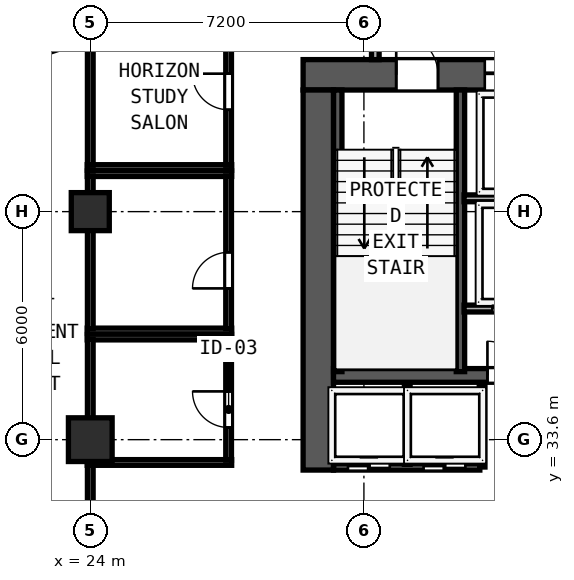
"""IFC4 building model, lengths in metres.
Left out: names, types, materials, properties, quantities, classifications, styles, units other than length and angle.
Written with IfcOpenShell. Run it as: python <this file> out.ifc"""

import sys

from ifc_helpers import new_model, si_unit, direction, frame, frame_2d, origin, origin_2d, place, context, subcontext, project, spatial, rectangle, hollow_rectangle, extrude, element, fill, save


model = new_model("IFC4")
c1 = context("Model", 3, precision=1e-05, world=origin(), true_north=direction((0.0, 1.0)))
c2 = subcontext(c1, "Body", "Model", "MODEL_VIEW")
j1 = project(units=[si_unit("LENGTHUNIT", "METRE"), si_unit("PLANEANGLEUNIT", "RADIAN")], contexts=[c1])
p1 = place(None, origin())
s1 = spatial("IfcSite", under=j1, at=p1, CompositionType="ELEMENT")
p2 = place(p1, origin())
s2 = spatial("IfcBuilding", under=s1, at=p2, CompositionType="ELEMENT")
p3 = place(p2, frame((0.0, 0.0, 70.4)))
s3 = spatial("IfcBuildingStorey", under=s2, at=p3, CompositionType="ELEMENT", Elevation=70.4)
p4 = place(p3, frame((29.6, 43.2, 0.0), z_axis=(0.0, 0.0, 1.0), x_axis=(1.0, 0.0, 0.0)))
e1 = element("IfcWall", 1, at=p4, inside=s3, PredefinedType="SHEAR", context=c2, shape_type="SweptSolid", body=[
    extrude(rectangle(XDim=17.6, YDim=0.8, at=frame_2d((8.8, 0.0))), origin(), (0.0, 0.0, 1.0), 3.6),
])
p5 = place(p4, frame((2.45, 0.0, 0.0)))
e2 = element("IfcOpeningElement", 2, at=p5, cuts=e1, PredefinedType="OPENING", context=c2, shape_type="SweptSolid", body=[
    extrude(rectangle(XDim=1.1, YDim=2.15, at=frame_2d((0.55, 1.075))), frame((0.0, 0.41, 0.0), z_axis=(0.0, -1.0, 0.0), x_axis=(1.0, 0.0, 0.0)), (0.0, 0.0, 1.0), 0.82),
])
p6 = place(p4, frame((7.56, 0.0, 0.0)))
e3 = element("IfcOpeningElement", 3, at=p6, cuts=e1, PredefinedType="OPENING", context=c2, shape_type="SweptSolid", body=[
    extrude(rectangle(XDim=1.1, YDim=2.15, at=frame_2d((0.55, 1.075))), frame((0.0, 0.41, 0.0), z_axis=(0.0, -1.0, 0.0), x_axis=(1.0, 0.0, 0.0)), (0.0, 0.0, 1.0), 0.82),
])
p7 = place(p4, frame((13.65, 0.0, 0.0)))
e4 = element("IfcOpeningElement", 4, at=p7, cuts=e1, PredefinedType="OPENING", context=c2, shape_type="SweptSolid", body=[
    extrude(rectangle(XDim=1.1, YDim=2.15, at=frame_2d((0.55, 1.075))), frame((0.0, 0.41, 0.0), z_axis=(0.0, -1.0, 0.0), x_axis=(1.0, 0.0, 0.0)), (0.0, 0.0, 1.0), 0.82),
])
p8 = place(p4, frame((4.78, 0.0, 0.0)))
e5 = element("IfcOpeningElement", 5, at=p8, cuts=e1, PredefinedType="OPENING", context=c2, shape_type="SweptSolid", body=[
    extrude(rectangle(XDim=1.1, YDim=2.2, at=frame_2d((0.55, 1.1))), frame((0.0, 0.41, 0.0), z_axis=(0.0, -1.0, 0.0), x_axis=(1.0, 0.0, 0.0)), (0.0, 0.0, 1.0), 0.82),
])
p9 = place(p4, frame((11.14, 0.0, 0.0)))
e6 = element("IfcOpeningElement", 6, at=p9, cuts=e1, PredefinedType="OPENING", context=c2, shape_type="SweptSolid", body=[
    extrude(rectangle(XDim=1.1, YDim=2.2, at=frame_2d((0.55, 1.1))), frame((0.0, 0.41, 0.0), z_axis=(0.0, -1.0, 0.0), x_axis=(1.0, 0.0, 0.0)), (0.0, 0.0, 1.0), 0.82),
])
p10 = place(p3, frame((30.0, 32.8, 0.0), z_axis=(0.0, 0.0, 1.0), x_axis=(0.0, 1.0, 0.0)))
e7 = element("IfcWall", 7, at=p10, inside=s3, PredefinedType="SHEAR", context=c2, shape_type="SweptSolid", body=[
    extrude(rectangle(XDim=10.0, YDim=0.8, at=frame_2d((5.0, 0.0))), origin(), (0.0, 0.0, 1.0), 3.6),
])
p11 = place(p3, frame((30.4, 35.29, 0.0), z_axis=(0.0, 0.0, 1.0), x_axis=(1.0, 0.0, 0.0)))
e8 = element("IfcWall", 8, at=p11, inside=s3, PredefinedType="SHEAR", context=c2, shape_type="SweptSolid", body=[
    extrude(rectangle(XDim=16.0, YDim=0.36, at=frame_2d((8.0, 0.0))), origin(), (0.0, 0.0, 1.0), 3.6),
])
p12 = place(p11, frame((4.95, 0.0, 0.0), z_axis=(0.0, 0.0, 1.0), x_axis=(-1.0, 0.0, 0.0)))
e9 = element("IfcOpeningElement", 9, at=p12, cuts=e8, PredefinedType="OPENING", context=c2, shape_type="SweptSolid", body=[
    extrude(rectangle(XDim=0.9, YDim=2.1, at=frame_2d((0.45, 1.05))), frame((0.0, 0.19, 0.0), z_axis=(0.0, -1.0, 0.0), x_axis=(1.0, 0.0, 0.0)), (0.0, 0.0, 1.0), 0.38),
])
p13 = place(p11, frame((12.01, 0.0, 0.0), z_axis=(0.0, 0.0, 1.0), x_axis=(-1.0, 0.0, 0.0)))
e10 = element("IfcOpeningElement", 10, at=p13, cuts=e8, PredefinedType="OPENING", context=c2, shape_type="SweptSolid", body=[
    extrude(rectangle(XDim=0.9, YDim=2.1, at=frame_2d((0.45, 1.05))), frame((0.0, 0.19, 0.0), z_axis=(0.0, -1.0, 0.0), x_axis=(1.0, 0.0, 0.0)), (0.0, 0.0, 1.0), 0.38),
])
for number, where, z_axis, x_axis in (
    (11, (30.512, 35.39, 0.0), (0.0, 0.0, 1.0), (0.0, 1.0, 0.0)),
    (12, (33.74, 35.39, 0.0), (0.0, 0.0, 1.0), (0.0, 1.0, 0.0)),
):
    element("IfcWall", number, at=place(p3, frame(where, z_axis=z_axis, x_axis=x_axis)), inside=s3, PredefinedType="SHEAR", context=c2, shape_type="SweptSolid", body=[
        extrude(rectangle(XDim=7.41, YDim=0.22, at=frame_2d((3.705, 0.0))), origin(), (0.0, 0.0, 1.0), 3.6),
    ])
p14 = place(p3, frame((24.0, 33.6, 0.0), z_axis=(0.0, 0.0, 1.0), x_axis=(1.0, 0.0, 0.0)))
e13 = element("IfcColumn", 13, at=p14, inside=s3, PredefinedType="COLUMN", context=c2, shape_type="SweptSolid", body=[
    extrude(hollow_rectangle(XDim=1.15, YDim=1.15, WallThickness=0.042, at=origin_2d()), origin(), (0.0, 0.0, 1.0), 3.8),
])
p15 = place(p3, frame((24.0, 39.6, 0.0), z_axis=(0.0, 0.0, 1.0), x_axis=(1.0, 0.0, 0.0)))
e14 = element("IfcColumn", 14, at=p15, inside=s3, PredefinedType="COLUMN", context=c2, shape_type="SweptSolid", body=[
    extrude(hollow_rectangle(XDim=1.0, YDim=1.0, WallThickness=0.038, at=origin_2d()), origin(), (0.0, 0.0, 1.0), 3.8),
])
p16 = place(p3, frame((24.039, 44.287, 0.0), z_axis=(0.0, 0.0, 1.0), x_axis=(-0.948678995954, -0.316240672014, 0.0)))
e15 = element("IfcWall", 15, at=p16, inside=s3, PredefinedType="SOLIDWALL", context=c2, shape_type="SweptSolid", body=[
    extrude(rectangle(XDim=5.675, YDim=0.24, at=frame_2d((2.837, 0.0))), origin(), (0.0, 0.0, 1.0), 3.097),
])
p17 = place(p16, frame((1.6, 0.0, 0.85)))
e16 = element("IfcOpeningElement", 16, at=p17, cuts=e15, PredefinedType="OPENING", context=c2, shape_type="SweptSolid", body=[
    extrude(rectangle(XDim=1.2, YDim=1.85, at=frame_2d((0.6, 0.925))), frame((0.0, 0.13, 0.0), z_axis=(0.0, -1.0, 0.0), x_axis=(1.0, 0.0, 0.0)), (0.0, 0.0, 1.0), 0.26),
])
p18 = place(p16, frame((3.834, 0.0, 0.85)))
e17 = element("IfcOpeningElement", 17, at=p18, cuts=e15, PredefinedType="OPENING", context=c2, shape_type="SweptSolid", body=[
    extrude(rectangle(XDim=1.2, YDim=1.85, at=frame_2d((0.6, 0.925))), frame((0.0, 0.13, 0.0), z_axis=(0.0, -1.0, 0.0), x_axis=(1.0, 0.0, 0.0)), (0.0, 0.0, 1.0), 0.26),
])
p19 = place(p3, frame((31.5, 43.6, 0.0), z_axis=(0.0, 0.0, 1.0), x_axis=(0.0, 1.0, 0.0)))
e18 = element("IfcWall", 18, at=p19, inside=s3, PredefinedType="SOLIDWALL", context=c2, shape_type="SweptSolid", body=[
    extrude(rectangle(XDim=2.835, YDim=0.2, at=frame_2d((1.417, 0.0))), origin(), (0.0, 0.0, 1.0), 3.6),
])
p20 = place(p19, frame((1.8, 0.0, 0.0), z_axis=(0.0, 0.0, 1.0), x_axis=(-1.0, 0.0, 0.0)))
e19 = element("IfcOpeningElement", 19, at=p20, cuts=e18, PredefinedType="OPENING", context=c2, shape_type="SweptSolid", body=[
    extrude(rectangle(XDim=1.1, YDim=2.15, at=frame_2d((0.55, 1.075))), frame((0.0, 0.11, 0.0), z_axis=(0.0, -1.0, 0.0), x_axis=(1.0, 0.0, 0.0)), (0.0, 0.0, 1.0), 0.22),
])
p21 = place(p3, frame((33.835, 39.95, 0.0), z_axis=(0.0, 0.0, 1.0), x_axis=(1.0, 0.0, 0.0)))
e20 = element("IfcWall", 20, at=p21, inside=s3, PredefinedType="SOLIDWALL", context=c2, shape_type="SweptSolid", body=[
    extrude(rectangle(XDim=2.77, YDim=0.18, at=frame_2d((1.385, 0.0))), origin(), (0.0, 0.0, 1.0), 3.6),
])
p22 = place(p3, frame((33.835, 37.05, 0.0), z_axis=(0.0, 0.0, 1.0), x_axis=(1.0, 0.0, 0.0)))
e21 = element("IfcWall", 21, at=p22, inside=s3, PredefinedType="SOLIDWALL", context=c2, shape_type="SweptSolid", body=[
    extrude(rectangle(XDim=2.77, YDim=0.18, at=frame_2d((1.385, 0.0))), origin(), (0.0, 0.0, 1.0), 3.6),
])
p23 = place(p22, frame((1.945, 0.0, 0.0), z_axis=(0.0, 0.0, 1.0), x_axis=(-1.0, 0.0, 0.0)))
e22 = element("IfcOpeningElement", 22, at=p23, cuts=e21, PredefinedType="OPENING", context=c2, shape_type="SweptSolid", body=[
    extrude(rectangle(XDim=1.2, YDim=2.2, at=frame_2d((0.6, 1.1))), frame((0.0, 0.1, 0.0), z_axis=(0.0, -1.0, 0.0), x_axis=(1.0, 0.0, 0.0)), (0.0, 0.0, 1.0), 0.2),
])
p24 = place(p3, frame((34.31, 32.88, 0.0), z_axis=(0.0, 0.0, 1.0), x_axis=(0.0, 1.0, 0.0)))
e23 = element("IfcWall", 23, at=p24, inside=s3, PredefinedType="SOLIDWALL", context=c2, shape_type="SweptSolid", body=[
    extrude(rectangle(XDim=2.17, YDim=0.15, at=frame_2d((1.085, 0.0))), origin(), (0.0, 0.0, 1.0), 3.6),
])
p25 = place(p3, frame((30.4, 32.88, 0.0), z_axis=(0.0, 0.0, 1.0), x_axis=(1.0, 0.0, 0.0)))
e24 = element("IfcWall", 24, at=p25, inside=s3, PredefinedType="SOLIDWALL", context=c2, shape_type="SweptSolid", body=[
    extrude(rectangle(XDim=3.85, YDim=0.16, at=frame_2d((1.925, 0.0))), origin(), (0.0, 0.0, 1.0), 3.6),
])
p26 = place(p25, frame((1.48, 0.0, 0.0), z_axis=(0.0, 0.0, 1.0), x_axis=(-1.0, 0.0, 0.0)))
e25 = element("IfcOpeningElement", 25, at=p26, cuts=e24, PredefinedType="OPENING", context=c2, shape_type="SweptSolid", body=[
    extrude(rectangle(XDim=1.1, YDim=2.2, at=frame_2d((0.55, 1.1))), frame((0.0, 0.09, 0.0), z_axis=(0.0, -1.0, 0.0), x_axis=(1.0, 0.0, 0.0)), (0.0, 0.0, 1.0), 0.18),
])
p27 = place(p25, frame((3.47, 0.0, 0.0), z_axis=(0.0, 0.0, 1.0), x_axis=(-1.0, 0.0, 0.0)))
e26 = element("IfcOpeningElement", 26, at=p27, cuts=e24, PredefinedType="OPENING", context=c2, shape_type="SweptSolid", body=[
    extrude(rectangle(XDim=1.1, YDim=2.2, at=frame_2d((0.55, 1.1))), frame((0.0, 0.09, 0.0), z_axis=(0.0, -1.0, 0.0), x_axis=(1.0, 0.0, 0.0)), (0.0, 0.0, 1.0), 0.18),
])
p28 = place(p3, frame((32.34, 32.95, 0.0), z_axis=(0.0, 0.0, 1.0), x_axis=(0.0, 1.0, 0.0)))
e27 = element("IfcWall", 27, at=p28, inside=s3, PredefinedType="SOLIDWALL", context=c2, shape_type="SweptSolid", body=[
    extrude(rectangle(XDim=2.05, YDim=0.15, at=frame_2d((1.025, 0.0))), origin(), (0.0, 0.0, 1.0), 3.6),
])
for number, where, z_axis, x_axis in (
    (28, (23.92, 36.3, 0.0), (0.0, 0.0, 1.0), (1.0, 0.0, 0.0)),
    (29, (23.92, 33.0, 0.0), (0.0, 0.0, 1.0), (1.0, 0.0, 0.0)),
):
    element("IfcWall", number, at=place(p3, frame(where, z_axis=z_axis, x_axis=x_axis)), inside=s3, PredefinedType="PARTITIONING", context=c2, shape_type="SweptSolid", body=[
        extrude(rectangle(XDim=3.8, YDim=0.15, at=frame_2d((1.9, 0.0))), origin(), (0.0, 0.0, 1.0), 3.6),
    ])
p29 = place(p3, frame((24.0, 33.06, 0.0), z_axis=(0.0, 0.0, 1.0), x_axis=(0.0, 1.0, 0.0)))
e30 = element("IfcWall", 30, at=p29, inside=s3, PredefinedType="PARTITIONING", context=c2, shape_type="SweptSolid", body=[
    extrude(rectangle(XDim=3.18, YDim=0.15, at=frame_2d((1.59, 0.0))), origin(), (0.0, 0.0, 1.0), 3.097),
])
p30 = place(p3, frame((27.64, 33.06, 0.0), z_axis=(0.0, 0.0, 1.0), x_axis=(0.0, 1.0, 0.0)))
e31 = element("IfcWall", 31, at=p30, inside=s3, PredefinedType="PARTITIONING", context=c2, shape_type="SweptSolid", body=[
    extrude(rectangle(XDim=3.18, YDim=0.15, at=frame_2d((1.59, 0.0))), origin(), (0.0, 0.0, 1.0), 3.6),
])
p31 = place(p30, frame((1.81, 0.0, 0.0), z_axis=(0.0, 0.0, 1.0), x_axis=(-1.0, 0.0, 0.0)))
e32 = element("IfcOpeningElement", 32, at=p31, cuts=e31, PredefinedType="OPENING", context=c2, shape_type="SweptSolid", body=[
    extrude(rectangle(XDim=0.95, YDim=2.12, at=frame_2d((0.475, 1.06))), frame((0.0, 0.085, 0.0), z_axis=(0.0, -1.0, 0.0), x_axis=(1.0, 0.0, 0.0)), (0.0, 0.0, 1.0), 0.17),
])
for number, where, z_axis, x_axis in (
    (33, (23.92, 40.6, 0.0), (0.0, 0.0, 1.0), (1.0, 0.0, 0.0)),
    (34, (23.92, 36.46, 0.0), (0.0, 0.0, 1.0), (1.0, 0.0, 0.0)),
):
    element("IfcWall", number, at=place(p3, frame(where, z_axis=z_axis, x_axis=x_axis)), inside=s3, PredefinedType="PARTITIONING", context=c2, shape_type="SweptSolid", body=[
        extrude(rectangle(XDim=3.8, YDim=0.15, at=frame_2d((1.9, 0.0))), origin(), (0.0, 0.0, 1.0), 3.6),
    ])
p32 = place(p3, frame((24.0, 36.52, 0.0), z_axis=(0.0, 0.0, 1.0), x_axis=(0.0, 1.0, 0.0)))
e35 = element("IfcWall", 35, at=p32, inside=s3, PredefinedType="PARTITIONING", context=c2, shape_type="SweptSolid", body=[
    extrude(rectangle(XDim=4.02, YDim=0.15, at=frame_2d((2.01, 0.0))), origin(), (0.0, 0.0, 1.0), 3.097),
])
p33 = place(p3, frame((27.64, 36.52, 0.0), z_axis=(0.0, 0.0, 1.0), x_axis=(0.0, 1.0, 0.0)))
e36 = element("IfcWall", 36, at=p33, inside=s3, PredefinedType="PARTITIONING", context=c2, shape_type="SweptSolid", body=[
    extrude(rectangle(XDim=4.02, YDim=0.15, at=frame_2d((2.01, 0.0))), origin(), (0.0, 0.0, 1.0), 3.6),
])
p34 = place(p33, frame((2.01, 0.0, 0.0), z_axis=(0.0, 0.0, 1.0), x_axis=(-1.0, 0.0, 0.0)))
e37 = element("IfcOpeningElement", 37, at=p34, cuts=e36, PredefinedType="OPENING", context=c2, shape_type="SweptSolid", body=[
    extrude(rectangle(XDim=0.95, YDim=2.12, at=frame_2d((0.475, 1.06))), frame((0.0, 0.085, 0.0), z_axis=(0.0, -1.0, 0.0), x_axis=(1.0, 0.0, 0.0)), (0.0, 0.0, 1.0), 0.17),
])
p35 = place(p3, frame((23.92, 40.76, 0.0), z_axis=(0.0, 0.0, 1.0), x_axis=(1.0, 0.0, 0.0)))
e38 = element("IfcWall", 38, at=p35, inside=s3, PredefinedType="PARTITIONING", context=c2, shape_type="SweptSolid", body=[
    extrude(rectangle(XDim=3.8, YDim=0.15, at=frame_2d((1.9, 0.0))), origin(), (0.0, 0.0, 1.0), 3.6),
])
p36 = place(p3, frame((24.0, 40.82, 0.0), z_axis=(0.0, 0.0, 1.0), x_axis=(0.0, 1.0, 0.0)))
e39 = element("IfcWall", 39, at=p36, inside=s3, PredefinedType="PARTITIONING", context=c2, shape_type="SweptSolid", body=[
    extrude(rectangle(XDim=3.343, YDim=0.15, at=frame_2d((1.671, 0.0))), origin(), (0.0, 0.0, 1.0), 3.097),
])
p37 = place(p3, frame((27.64, 40.82, 0.0), z_axis=(0.0, 0.0, 1.0), x_axis=(0.0, 1.0, 0.0)))
e40 = element("IfcWall", 40, at=p37, inside=s3, PredefinedType="PARTITIONING", context=c2, shape_type="SweptSolid", body=[
    extrude(rectangle(XDim=5.14, YDim=0.15, at=frame_2d((2.57, 0.0))), origin(), (0.0, 0.0, 1.0), 3.6),
])
p38 = place(p37, frame((2.41, 0.0, 0.0), z_axis=(0.0, 0.0, 1.0), x_axis=(-1.0, 0.0, 0.0)))
e41 = element("IfcOpeningElement", 41, at=p38, cuts=e40, PredefinedType="OPENING", context=c2, shape_type="SweptSolid", body=[
    extrude(rectangle(XDim=0.95, YDim=2.12, at=frame_2d((0.475, 1.06))), frame((0.0, 0.085, 0.0), z_axis=(0.0, -1.0, 0.0), x_axis=(1.0, 0.0, 0.0)), (0.0, 0.0, 1.0), 0.17),
])
p39 = place(p3, frame((24.0, 26.94, 0.0), z_axis=(0.0, 0.0, 1.0), x_axis=(0.0, 1.0, 0.0)))
e42 = element("IfcWall", 42, at=p39, inside=s3, PredefinedType="PARTITIONING", context=c2, shape_type="SweptSolid", body=[
    extrude(rectangle(XDim=6.0, YDim=0.15, at=frame_2d((3.0, 0.0))), origin(), (0.0, 0.0, 1.0), 3.097),
])
p40 = place(p5, origin())
e43 = element("IfcDoor", 43, at=p40, inside=s3, OperationType="SINGLE_SWING_LEFT", PredefinedType="DOOR", context=c2, shape_type="SweptSolid", body=[
    extrude(rectangle(XDim=1.1, YDim=2.15, at=frame_2d((0.55, 1.075))), frame((0.0, 0.185, 0.0), z_axis=(0.0, -1.0, 0.0), x_axis=(1.0, 0.0, 0.0)), (0.0, 0.0, 1.0), 0.05),
])
fill(e2, e43)
p41 = place(p8, origin())
e44 = element("IfcDoor", 44, at=p41, inside=s3, OperationType="SLIDING_TO_LEFT", PredefinedType="DOOR", context=c2, shape_type="SweptSolid", body=[
    extrude(rectangle(XDim=1.1, YDim=2.2, at=frame_2d((0.55, 1.1))), frame((0.0, 0.185, 0.0), z_axis=(0.0, -1.0, 0.0), x_axis=(1.0, 0.0, 0.0)), (0.0, 0.0, 1.0), 0.05),
])
fill(e5, e44)
p42 = place(p23, origin())
e45 = element("IfcDoor", 45, at=p42, inside=s3, OperationType="SLIDING_TO_RIGHT", PredefinedType="DOOR", context=c2, shape_type="SweptSolid", body=[
    extrude(rectangle(XDim=1.2, YDim=2.2, at=frame_2d((0.6, 1.1))), frame((0.0, 0.025, 0.0), z_axis=(0.0, -1.0, 0.0), x_axis=(1.0, 0.0, 0.0)), (0.0, 0.0, 1.0), 0.05),
])
fill(e22, e45)
p43 = place(p12, origin())
e46 = element("IfcDoor", 46, at=p43, inside=s3, OperationType="SINGLE_SWING_RIGHT", PredefinedType="DOOR", context=c2, shape_type="SweptSolid", body=[
    extrude(rectangle(XDim=0.9, YDim=2.1, at=frame_2d((0.45, 1.05))), frame((0.0, 0.025, 0.0), z_axis=(0.0, -1.0, 0.0), x_axis=(1.0, 0.0, 0.0)), (0.0, 0.0, 1.0), 0.05),
])
fill(e9, e46)
p44 = place(p26, origin())
e47 = element("IfcDoor", 47, at=p44, inside=s3, OperationType="SLIDING_TO_LEFT", PredefinedType="DOOR", context=c2, shape_type="SweptSolid", body=[
    extrude(rectangle(XDim=1.1, YDim=2.2, at=frame_2d((0.55, 1.1))), frame((0.0, 0.025, 0.0), z_axis=(0.0, -1.0, 0.0), x_axis=(1.0, 0.0, 0.0)), (0.0, 0.0, 1.0), 0.05),
])
fill(e25, e47)
p45 = place(p27, origin())
e48 = element("IfcDoor", 48, at=p45, inside=s3, OperationType="SLIDING_TO_LEFT", PredefinedType="DOOR", context=c2, shape_type="SweptSolid", body=[
    extrude(rectangle(XDim=1.1, YDim=2.2, at=frame_2d((0.55, 1.1))), frame((0.0, 0.025, 0.0), z_axis=(0.0, -1.0, 0.0), x_axis=(1.0, 0.0, 0.0)), (0.0, 0.0, 1.0), 0.05),
])
fill(e26, e48)
p46 = place(p31, origin())
e49 = element("IfcDoor", 49, at=p46, inside=s3, OperationType="SINGLE_SWING_LEFT", PredefinedType="DOOR", context=c2, shape_type="SweptSolid", body=[
    extrude(rectangle(XDim=0.95, YDim=2.12, at=frame_2d((0.475, 1.06))), frame((0.0, 0.025, 0.0), z_axis=(0.0, -1.0, 0.0), x_axis=(1.0, 0.0, 0.0)), (0.0, 0.0, 1.0), 0.05),
])
fill(e32, e49)
p47 = place(p34, origin())
e50 = element("IfcDoor", 50, at=p47, inside=s3, OperationType="SINGLE_SWING_RIGHT", PredefinedType="DOOR", context=c2, shape_type="SweptSolid", body=[
    extrude(rectangle(XDim=0.95, YDim=2.12, at=frame_2d((0.475, 1.06))), frame((0.0, 0.025, 0.0), z_axis=(0.0, -1.0, 0.0), x_axis=(1.0, 0.0, 0.0)), (0.0, 0.0, 1.0), 0.05),
])
fill(e37, e50)
p48 = place(p38, origin())
e51 = element("IfcDoor", 51, at=p48, inside=s3, OperationType="SINGLE_SWING_LEFT", PredefinedType="DOOR", context=c2, shape_type="SweptSolid", body=[
    extrude(rectangle(XDim=0.95, YDim=2.12, at=frame_2d((0.475, 1.06))), frame((0.0, 0.025, 0.0), z_axis=(0.0, -1.0, 0.0), x_axis=(1.0, 0.0, 0.0)), (0.0, 0.0, 1.0), 0.05),
])
fill(e41, e51)
save(model, sys.argv[1])
